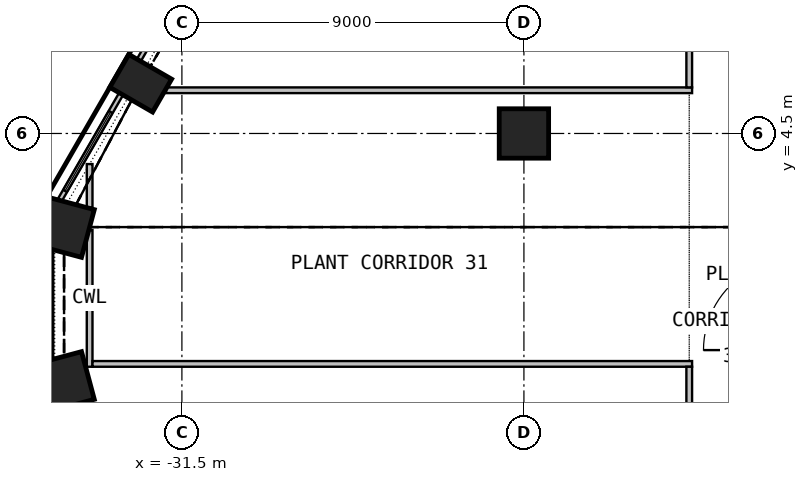
"""IFC4 building model, lengths in metres.
Left out: names, types, materials, properties, quantities, classifications, styles, units other than length and angle.
Written with IfcOpenShell. Run it as: python <this file> out.ifc"""

import sys

from ifc_helpers import new_model, si_unit, direction, frame, frame_2d, origin, origin_2d, place, context, subcontext, project, spatial, rectangle, circle, extrude, element, fill, save


model = new_model("IFC4")
c1 = context("Model", 3, precision=1e-05, world=origin(), true_north=direction((0.0, 1.0)))
c2 = subcontext(c1, "Body", "Model", "MODEL_VIEW")
j1 = project(units=[si_unit("LENGTHUNIT", "METRE"), si_unit("PLANEANGLEUNIT", "RADIAN")], contexts=[c1])
p1 = place(None, origin())
s1 = spatial("IfcSite", under=j1, at=p1, CompositionType="ELEMENT")
p2 = place(p1, origin())
s2 = spatial("IfcBuilding", under=s1, at=p2, CompositionType="ELEMENT")
p3 = place(p2, frame((0.0, 0.0, 128.1)))
s3 = spatial("IfcBuildingStorey", under=s2, at=p3, CompositionType="ELEMENT", Elevation=128.1)
p4 = place(p3, frame((-32.584, 5.822, 0.0), z_axis=(0.0, 0.0, 1.0), x_axis=(-0.5, -0.866025403784, 0.0)))
e1 = element("IfcColumn", 1, at=p4, inside=s3, PredefinedType="COLUMN", context=c2, shape_type="SweptSolid", body=[
    extrude(rectangle(XDim=1.0, YDim=1.3, at=origin_2d()), origin(), (0.0, 0.0, 1.0), 4.175),
])
for number, where, z_axis, x_axis in (
    (2, (-34.601, 2.037, 0.0), (0.0, 0.0, 1.0), (-0.259, -0.966, 0.0)),
    (3, (-34.601, -2.037, 0.0), (0.0, 0.0, 1.0), (0.259, -0.966, 0.0)),
):
    element("IfcColumn", number, at=place(p3, frame(where, z_axis=z_axis, x_axis=x_axis)), inside=s3, PredefinedType="COLUMN", context=c2, shape_type="SweptSolid", body=[
        extrude(rectangle(XDim=1.3, YDim=1.3, at=origin_2d()), origin(), (0.0, 0.0, 1.0), 4.175),
    ])
p5 = place(p3, frame((-22.5, 4.5, 0.0), z_axis=(0.0, 0.0, 1.0), x_axis=(1.0, 0.0, 0.0)))
e4 = element("IfcColumn", 4, at=p5, inside=s3, PredefinedType="COLUMN", context=c2, shape_type="SweptSolid", body=[
    extrude(circle(Radius=0.65, at=origin_2d()), origin(), (0.0, 0.0, 1.0), 4.175),
])
p6 = place(p3, frame((-30.883, 9.458, 0.0), z_axis=(0.0, 0.0, 1.0), x_axis=(-0.499996256241, -0.866027565234, 0.0)))
e5 = element("IfcWall", 5, at=p6, inside=s3, PredefinedType="SOLIDWALL", context=c2, shape_type="SweptSolid", body=[
    extrude(rectangle(XDim=3.499, YDim=0.12, at=frame_2d((1.75, 0.0))), origin(), (0.0, 0.0, 1.0), 4.175),
])
p7 = place(p6, frame((0.55, 0.0, 0.6)))
e6 = element("IfcOpeningElement", 6, at=p7, cuts=e5, PredefinedType="OPENING", context=c2, shape_type="SweptSolid", body=[
    extrude(rectangle(XDim=2.4, YDim=3.0, at=frame_2d((1.2, 1.5))), frame((0.0, 0.07, 0.0), z_axis=(0.0, -1.0, 0.0), x_axis=(1.0, 0.0, 0.0)), (0.0, 0.0, 1.0), 0.14),
])
p8 = place(p3, frame((-33.1, 5.542, 0.0), z_axis=(0.0, 0.0, 1.0), x_axis=(-0.499974205047, -0.866040295995, 0.0)))
e7 = element("IfcWall", 7, at=p8, inside=s3, PredefinedType="SOLIDWALL", context=c2, shape_type="SweptSolid", body=[
    extrude(rectangle(XDim=3.218, YDim=0.12, at=frame_2d((1.609, 0.0))), origin(), (0.0, 0.0, 1.0), 4.175),
])
p9 = place(p8, frame((0.55, 0.0, 0.6)))
e8 = element("IfcOpeningElement", 8, at=p9, cuts=e7, PredefinedType="OPENING", context=c2, shape_type="SweptSolid", body=[
    extrude(rectangle(XDim=2.4, YDim=3.0, at=frame_2d((1.2, 1.5))), frame((0.0, 0.07, 0.0), z_axis=(0.0, -1.0, 0.0), x_axis=(1.0, 0.0, 0.0)), (0.0, 0.0, 1.0), 0.14),
])
p10 = place(p3, frame((-34.946, 1.44, 0.0), z_axis=(0.0, 0.0, 1.0), x_axis=(0.0, -1.0, 0.0)))
e9 = element("IfcWall", 9, at=p10, inside=s3, PredefinedType="SOLIDWALL", context=c2, shape_type="SweptSolid", body=[
    extrude(rectangle(XDim=2.88, YDim=0.12, at=frame_2d((1.44, 0.0))), origin(), (0.0, 0.0, 1.0), 4.175),
])
p11 = place(p10, frame((0.24, 0.0, 0.6)))
e10 = element("IfcOpeningElement", 10, at=p11, cuts=e9, PredefinedType="OPENING", context=c2, shape_type="SweptSolid", body=[
    extrude(rectangle(XDim=2.4, YDim=3.0, at=frame_2d((1.2, 1.5))), frame((0.0, 0.07, 0.0), z_axis=(0.0, -1.0, 0.0), x_axis=(1.0, 0.0, 0.0)), (0.0, 0.0, 1.0), 0.14),
])
p12 = place(p3, frame((-33.928, -1.638, 0.0), z_axis=(0.0, 0.0, 1.0), x_axis=(0.0, 1.0, 0.0)))
e11 = element("IfcWall", 11, at=p12, inside=s3, PredefinedType="PARTITIONING", context=c2, shape_type="SweptSolid", body=[
    extrude(rectangle(XDim=3.598, YDim=0.15, at=frame_2d((1.799, 0.0))), origin(), (0.0, 0.0, 1.0), 4.175),
])
p13 = place(p3, frame((-33.928, 2.55, 0.0), z_axis=(0.0, 0.0, 1.0), x_axis=(0.0, 1.0, 0.0)))
e12 = element("IfcWall", 12, at=p13, inside=s3, PredefinedType="PARTITIONING", context=c2, shape_type="SweptSolid", body=[
    extrude(rectangle(XDim=1.145, YDim=0.15, at=frame_2d((0.573, 0.0))), origin(), (0.0, 0.0, 1.0), 4.175),
])
p14 = place(p3, frame((-18.075, -1.563, 0.0), z_axis=(0.0, 0.0, 1.0), x_axis=(-1.0, 0.0, 0.0)))
e13 = element("IfcWall", 13, at=p14, inside=s3, PredefinedType="PARTITIONING", context=c2, shape_type="SweptSolid", body=[
    extrude(rectangle(XDim=15.778, YDim=0.15, at=frame_2d((7.889, 0.0))), origin(), (0.0, 0.0, 1.0), 4.175),
])
p15 = place(p3, frame((-31.917, 5.637, 0.0), z_axis=(0.0, 0.0, 1.0), x_axis=(1.0, 0.0, 0.0)))
e14 = element("IfcWall", 14, at=p15, inside=s3, PredefinedType="PARTITIONING", context=c2, shape_type="SweptSolid", body=[
    extrude(rectangle(XDim=13.843, YDim=0.15, at=frame_2d((6.921, 0.0))), origin(), (0.0, 0.0, 1.0), 4.175),
])
p16 = place(p3, frame((-18.15, -1.638, 0.0), z_axis=(0.0, 0.0, 1.0), x_axis=(0.0, -1.0, 0.0)))
e15 = element("IfcWall", 15, at=p16, inside=s3, PredefinedType="PARTITIONING", context=c2, shape_type="SweptSolid", body=[
    extrude(rectangle(XDim=14.337, YDim=0.15, at=frame_2d((7.168, 0.0))), origin(), (0.0, 0.0, 1.0), 4.175),
])
p17 = place(p3, frame((-18.15, 15.975, 0.0), z_axis=(0.0, 0.0, 1.0), x_axis=(0.0, -1.0, 0.0)))
e16 = element("IfcWall", 16, at=p17, inside=s3, PredefinedType="PARTITIONING", context=c2, shape_type="SweptSolid", body=[
    extrude(rectangle(XDim=10.263, YDim=0.15, at=frame_2d((5.132, 0.0))), origin(), (0.0, 0.0, 1.0), 4.175),
])
p18 = place(p9, origin())
e17 = element("IfcWindow", 17, at=p18, inside=s3, PartitioningType="SINGLE_PANEL", PredefinedType="WINDOW", context=c2, shape_type="SweptSolid", body=[
    extrude(rectangle(XDim=2.4, YDim=3.0, at=frame_2d((1.2, 1.5))), frame((0.0, 0.06, 0.0), z_axis=(0.0, -1.0, 0.0), x_axis=(1.0, 0.0, 0.0)), (0.0, 0.0, 1.0), 0.02),
])
fill(e8, e17)
p19 = place(p11, origin())
e18 = element("IfcWindow", 18, at=p19, inside=s3, PartitioningType="SINGLE_PANEL", PredefinedType="WINDOW", context=c2, shape_type="SweptSolid", body=[
    extrude(rectangle(XDim=2.4, YDim=3.0, at=frame_2d((1.2, 1.5))), frame((0.0, 0.06, 0.0), z_axis=(0.0, -1.0, 0.0), x_axis=(1.0, 0.0, 0.0)), (0.0, 0.0, 1.0), 0.02),
])
fill(e10, e18)
save(model, sys.argv[1])
